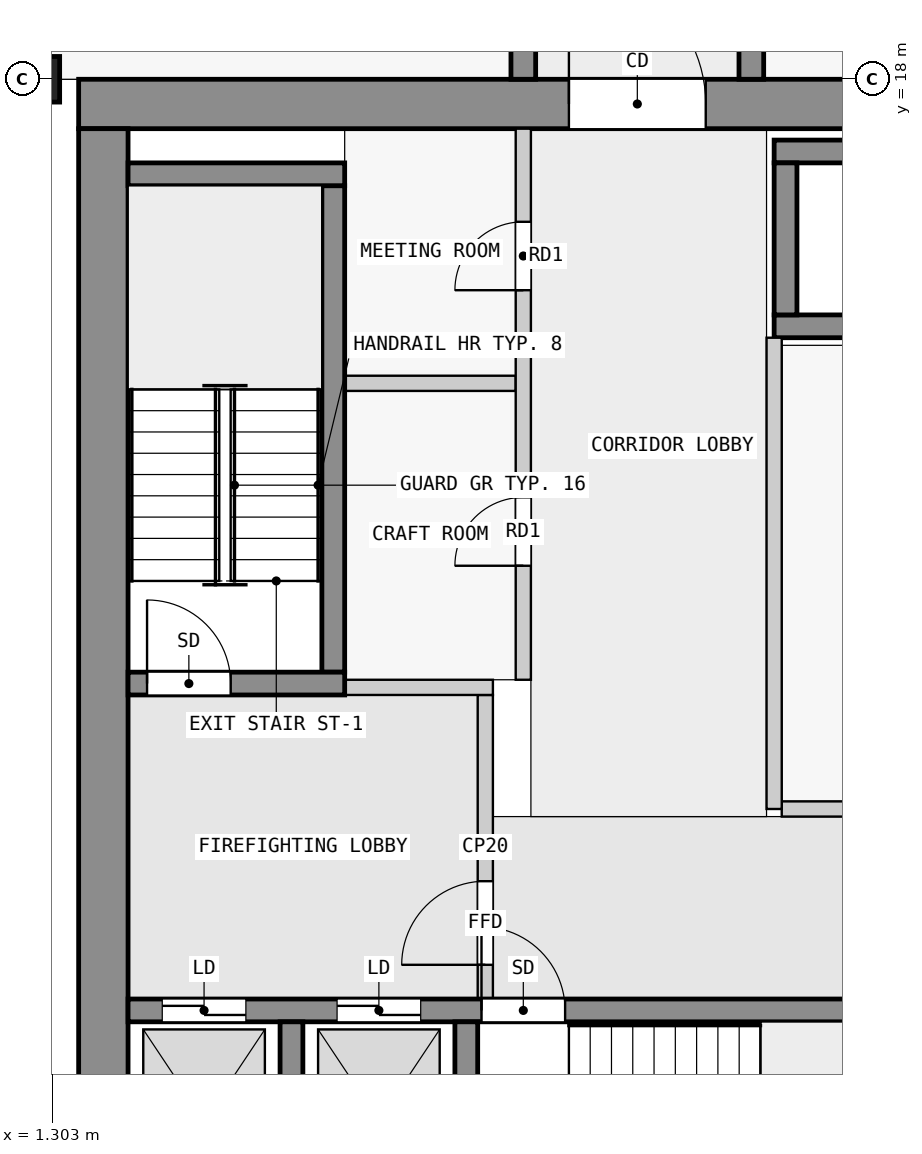
"""IFC4 building model, lengths in metres.
Left out: names, types, materials, properties, quantities, classifications, styles, units other than length and angle.
Written with IfcOpenShell. Run it as: python <this file> out.ifc"""

import sys

from ifc_helpers import new_model, si_unit, direction, frame, frame_2d, origin, origin_2d, place, context, subcontext, project, spatial, rectangle, extrude, element, fill, save


model = new_model("IFC4")
c1 = context("Model", 3, precision=1e-05, world=origin(), true_north=direction((0.0, 1.0)))
c2 = subcontext(c1, "Body", "Model", "MODEL_VIEW")
j1 = project(units=[si_unit("LENGTHUNIT", "METRE"), si_unit("PLANEANGLEUNIT", "RADIAN")], contexts=[c1])
p1 = place(None, origin())
s1 = spatial("IfcSite", under=j1, at=p1, CompositionType="ELEMENT")
p2 = place(p1, origin())
s2 = spatial("IfcBuilding", under=s1, at=p2, CompositionType="ELEMENT")
p3 = place(p2, frame((0.0, 0.0, 120.3)))
s3 = spatial("IfcBuildingStorey", under=s2, at=p3, CompositionType="ELEMENT", Elevation=120.3)
p4 = place(p3, frame((0.7, 18.0, 0.0), z_axis=(0.0, 0.0, 1.0), x_axis=(0.0, 1.0, 0.0)))
e1 = element("IfcColumn", 1, at=p4, inside=s3, PredefinedType="COLUMN", context=c2, shape_type="SweptSolid", body=[
    extrude(rectangle(XDim=0.6, YDim=1.4, at=origin_2d()), origin(), (0.0, 0.0, 1.0), 3.5),
])
p5 = place(p3, frame((1.65, 17.675, 0.0), z_axis=(0.0, 0.0, 1.0), x_axis=(1.0, 0.0, 0.0)))
e2 = element("IfcWall", 2, at=p5, inside=s3, PredefinedType="SHEAR", context=c2, shape_type="SweptSolid", body=[
    extrude(rectangle(XDim=20.85, YDim=0.65, at=frame_2d((10.425, 0.0))), origin(), (0.0, 0.0, 1.0), 3.2),
])
p6 = place(p5, frame((6.45, 0.0, 0.0)))
e3 = element("IfcOpeningElement", 3, at=p6, cuts=e2, PredefinedType="OPENING", context=c2, shape_type="SweptSolid", body=[
    extrude(rectangle(XDim=1.8, YDim=2.1, at=frame_2d((0.9, 1.05))), frame((0.0, 0.335, 0.0), z_axis=(0.0, -1.0, 0.0), x_axis=(1.0, 0.0, 0.0)), (0.0, 0.0, 1.0), 0.67),
])
p7 = place(p3, frame((1.975, 2.5, 0.0), z_axis=(0.0, 0.0, 1.0), x_axis=(0.0, 1.0, 0.0)))
e4 = element("IfcWall", 4, at=p7, inside=s3, PredefinedType="SHEAR", context=c2, shape_type="SweptSolid", body=[
    extrude(rectangle(XDim=14.85, YDim=0.65, at=frame_2d((7.425, 0.0))), origin(), (0.0, 0.0, 1.0), 3.2),
])
for number, where, z_axis, x_axis in (
    (5, (4.45, 2.8, 0.0), (0.0, 0.0, 1.0), (0.0, 1.0, 0.0)),
    (6, (6.75, 2.8, 0.0), (0.0, 0.0, 1.0), (0.0, 1.0, 0.0)),
):
    element("IfcWall", number, at=place(p3, frame(where, z_axis=z_axis, x_axis=x_axis)), inside=s3, PredefinedType="SHEAR", context=c2, shape_type="SweptSolid", body=[
        extrude(rectangle(XDim=2.8, YDim=0.3, at=frame_2d((1.4, 0.0))), origin(), (0.0, 0.0, 1.0), 3.2),
    ])
p8 = place(p3, frame((2.3, 5.75, 0.0), z_axis=(0.0, 0.0, 1.0), x_axis=(1.0, 0.0, 0.0)))
e7 = element("IfcWall", 7, at=p8, inside=s3, PredefinedType="SHEAR", context=c2, shape_type="SweptSolid", body=[
    extrude(rectangle(XDim=18.8, YDim=0.3, at=frame_2d((9.4, 0.0))), origin(), (0.0, 0.0, 1.0), 3.2),
])
p9 = place(p8, frame((4.65, 0.0, 0.0)))
e8 = element("IfcOpeningElement", 8, at=p9, cuts=e7, PredefinedType="OPENING", context=c2, shape_type="SweptSolid", body=[
    extrude(rectangle(XDim=1.1, YDim=2.1, at=frame_2d((0.55, 1.05))), frame((0.0, 0.16, 0.0), z_axis=(0.0, -1.0, 0.0), x_axis=(1.0, 0.0, 0.0)), (0.0, 0.0, 1.0), 0.32),
])
p10 = place(p8, frame((0.45, 0.0, 0.0)))
e9 = element("IfcOpeningElement", 9, at=p10, cuts=e7, PredefinedType="OPENING", context=c2, shape_type="SweptSolid", body=[
    extrude(rectangle(XDim=1.1, YDim=2.1, at=frame_2d((0.55, 1.05))), frame((0.0, 0.16, 0.0), z_axis=(0.0, -1.0, 0.0), x_axis=(1.0, 0.0, 0.0)), (0.0, 0.0, 1.0), 0.32),
])
p11 = place(p8, frame((2.75, 0.0, 0.0)))
e10 = element("IfcOpeningElement", 10, at=p11, cuts=e7, PredefinedType="OPENING", context=c2, shape_type="SweptSolid", body=[
    extrude(rectangle(XDim=1.1, YDim=2.1, at=frame_2d((0.55, 1.05))), frame((0.0, 0.16, 0.0), z_axis=(0.0, -1.0, 0.0), x_axis=(1.0, 0.0, 0.0)), (0.0, 0.0, 1.0), 0.32),
])
p12 = place(p8, frame((11.85, 0.0, 0.0)))
e11 = element("IfcOpeningElement", 11, at=p12, cuts=e7, PredefinedType="OPENING", context=c2, shape_type="SweptSolid", body=[
    extrude(rectangle(XDim=1.1, YDim=2.1, at=frame_2d((0.55, 1.05))), frame((0.0, 0.16, 0.0), z_axis=(0.0, -1.0, 0.0), x_axis=(1.0, 0.0, 0.0)), (0.0, 0.0, 1.0), 0.32),
])
p13 = place(p8, frame((14.35, 0.0, 0.0)))
e12 = element("IfcOpeningElement", 12, at=p13, cuts=e7, PredefinedType="OPENING", context=c2, shape_type="SweptSolid", body=[
    extrude(rectangle(XDim=1.1, YDim=2.1, at=frame_2d((0.55, 1.05))), frame((0.0, 0.16, 0.0), z_axis=(0.0, -1.0, 0.0), x_axis=(1.0, 0.0, 0.0)), (0.0, 0.0, 1.0), 0.32),
])
p14 = place(p8, frame((16.85, 0.0, 0.0)))
e13 = element("IfcOpeningElement", 13, at=p14, cuts=e7, PredefinedType="OPENING", context=c2, shape_type="SweptSolid", body=[
    extrude(rectangle(XDim=1.1, YDim=2.1, at=frame_2d((0.55, 1.05))), frame((0.0, 0.16, 0.0), z_axis=(0.0, -1.0, 0.0), x_axis=(1.0, 0.0, 0.0)), (0.0, 0.0, 1.0), 0.32),
])
p15 = place(p3, frame((2.3, 10.05, 0.0), z_axis=(0.0, 0.0, 1.0), x_axis=(1.0, 0.0, 0.0)))
e14 = element("IfcWall", 14, at=p15, inside=s3, PredefinedType="SHEAR", context=c2, shape_type="SweptSolid", body=[
    extrude(rectangle(XDim=2.85, YDim=0.3, at=frame_2d((1.425, 0.0))), origin(), (0.0, 0.0, 1.0), 3.2),
])
p16 = place(p15, frame((0.25, 0.0, 0.0)))
e15 = element("IfcOpeningElement", 15, at=p16, cuts=e14, PredefinedType="OPENING", context=c2, shape_type="SweptSolid", body=[
    extrude(rectangle(XDim=1.1, YDim=2.1, at=frame_2d((0.55, 1.05))), frame((0.0, 0.16, 0.0), z_axis=(0.0, -1.0, 0.0), x_axis=(1.0, 0.0, 0.0)), (0.0, 0.0, 1.0), 0.32),
])
p17 = place(p3, frame((5.0, 10.2, 0.0), z_axis=(0.0, 0.0, 1.0), x_axis=(0.0, 1.0, 0.0)))
e16 = element("IfcWall", 16, at=p17, inside=s3, PredefinedType="SHEAR", context=c2, shape_type="SweptSolid", body=[
    extrude(rectangle(XDim=6.4, YDim=0.3, at=frame_2d((3.2, 0.0))), origin(), (0.0, 0.0, 1.0), 3.2),
])
p18 = place(p3, frame((2.3, 16.75, 0.0), z_axis=(0.0, 0.0, 1.0), x_axis=(1.0, 0.0, 0.0)))
e17 = element("IfcWall", 17, at=p18, inside=s3, PredefinedType="SHEAR", context=c2, shape_type="SweptSolid", body=[
    extrude(rectangle(XDim=2.85, YDim=0.3, at=frame_2d((1.425, 0.0))), origin(), (0.0, 0.0, 1.0), 3.2),
])
for number, where, z_axis, x_axis in (
    (18, (10.8, 17.05, 0.0), (0.0, 0.0, 1.0), (1.0, 0.0, 0.0)),
    (19, (10.8, 14.75, 0.0), (0.0, 0.0, 1.0), (1.0, 0.0, 0.0)),
):
    element("IfcWall", number, at=place(p3, frame(where, z_axis=z_axis, x_axis=x_axis)), inside=s3, PredefinedType="SHEAR", context=c2, shape_type="SweptSolid", body=[
        extrude(rectangle(XDim=7.8, YDim=0.3, at=frame_2d((3.9, 0.0))), origin(), (0.0, 0.0, 1.0), 3.2),
    ])
p19 = place(p3, frame((10.95, 14.9, 0.0), z_axis=(0.0, 0.0, 1.0), x_axis=(0.0, 1.0, 0.0)))
e20 = element("IfcWall", 20, at=p19, inside=s3, PredefinedType="SHEAR", context=c2, shape_type="SweptSolid", body=[
    extrude(rectangle(XDim=2.0, YDim=0.3, at=frame_2d((1.0, 0.0))), origin(), (0.0, 0.0, 1.0), 3.2),
])
p20 = place(p3, frame((7.5, 18.0, 0.0), z_axis=(0.0, 0.0, 1.0), x_axis=(0.0, 1.0, 0.0)))
e21 = element("IfcWall", 21, at=p20, inside=s3, PredefinedType="SHEAR", context=c2, shape_type="SweptSolid", body=[
    extrude(rectangle(XDim=27.0, YDim=0.325, at=frame_2d((13.5, 0.0))), origin(), (0.0, 0.0, 1.0), 3.2),
])
p21 = place(p20, frame((1.75, 0.0, 0.0)))
e22 = element("IfcOpeningElement", 22, at=p21, cuts=e21, PredefinedType="OPENING", context=c2, shape_type="SweptSolid", body=[
    extrude(rectangle(XDim=1.0, YDim=2.1, at=frame_2d((0.5, 1.05))), frame((0.0, 0.172, 0.0), z_axis=(0.0, -1.0, 0.0), x_axis=(1.0, 0.0, 0.0)), (0.0, 0.0, 1.0), 0.345),
])
p22 = place(p20, frame((9.25, 0.0, 0.0)))
e23 = element("IfcOpeningElement", 23, at=p22, cuts=e21, PredefinedType="OPENING", context=c2, shape_type="SweptSolid", body=[
    extrude(rectangle(XDim=1.0, YDim=2.1, at=frame_2d((0.5, 1.05))), frame((0.0, 0.172, 0.0), z_axis=(0.0, -1.0, 0.0), x_axis=(1.0, 0.0, 0.0)), (0.0, 0.0, 1.0), 0.345),
])
p23 = place(p20, frame((21.35, 0.0, 0.0)))
e24 = element("IfcOpeningElement", 24, at=p23, cuts=e21, PredefinedType="OPENING", context=c2, shape_type="SweptSolid", body=[
    extrude(rectangle(XDim=1.0, YDim=2.1, at=frame_2d((0.5, 1.05))), frame((0.0, 0.172, 0.0), z_axis=(0.0, -1.0, 0.0), x_axis=(1.0, 0.0, 0.0)), (0.0, 0.0, 1.0), 0.345),
])
p24 = place(p3, frame((10.5, 18.0, 0.0), z_axis=(0.0, 0.0, 1.0), x_axis=(0.0, 1.0, 0.0)))
e25 = element("IfcWall", 25, at=p24, inside=s3, PredefinedType="SHEAR", context=c2, shape_type="SweptSolid", body=[
    extrude(rectangle(XDim=27.0, YDim=0.325, at=frame_2d((13.5, 0.0))), origin(), (0.0, 0.0, 1.0), 3.2),
])
p25 = place(p24, frame((1.75, 0.0, 0.0)))
e26 = element("IfcOpeningElement", 26, at=p25, cuts=e25, PredefinedType="OPENING", context=c2, shape_type="SweptSolid", body=[
    extrude(rectangle(XDim=1.0, YDim=2.1, at=frame_2d((0.5, 1.05))), frame((0.0, 0.172, 0.0), z_axis=(0.0, -1.0, 0.0), x_axis=(1.0, 0.0, 0.0)), (0.0, 0.0, 1.0), 0.345),
])
p26 = place(p24, frame((6.25, 0.0, 0.0)))
e27 = element("IfcOpeningElement", 27, at=p26, cuts=e25, PredefinedType="OPENING", context=c2, shape_type="SweptSolid", body=[
    extrude(rectangle(XDim=1.0, YDim=2.1, at=frame_2d((0.5, 1.05))), frame((0.0, 0.172, 0.0), z_axis=(0.0, -1.0, 0.0), x_axis=(1.0, 0.0, 0.0)), (0.0, 0.0, 1.0), 0.345),
])
p27 = place(p24, frame((13.05, 0.0, 0.0)))
e28 = element("IfcOpeningElement", 28, at=p27, cuts=e25, PredefinedType="OPENING", context=c2, shape_type="SweptSolid", body=[
    extrude(rectangle(XDim=1.0, YDim=2.1, at=frame_2d((0.5, 1.05))), frame((0.0, 0.172, 0.0), z_axis=(0.0, -1.0, 0.0), x_axis=(1.0, 0.0, 0.0)), (0.0, 0.0, 1.0), 0.345),
])
p28 = place(p24, frame((19.75, 0.0, 0.0)))
e29 = element("IfcOpeningElement", 29, at=p28, cuts=e25, PredefinedType="OPENING", context=c2, shape_type="SweptSolid", body=[
    extrude(rectangle(XDim=1.0, YDim=2.1, at=frame_2d((0.5, 1.05))), frame((0.0, 0.172, 0.0), z_axis=(0.0, -1.0, 0.0), x_axis=(1.0, 0.0, 0.0)), (0.0, 0.0, 1.0), 0.345),
])
p29 = place(p24, frame((23.25, 0.0, 0.0)))
e30 = element("IfcOpeningElement", 30, at=p29, cuts=e25, PredefinedType="OPENING", context=c2, shape_type="SweptSolid", body=[
    extrude(rectangle(XDim=0.9, YDim=2.1, at=frame_2d((0.45, 1.05))), frame((0.0, 0.172, 0.0), z_axis=(0.0, -1.0, 0.0), x_axis=(1.0, 0.0, 0.0)), (0.0, 0.0, 1.0), 0.345),
])
p30 = place(p24, frame((25.45, 0.0, 0.0)))
e31 = element("IfcOpeningElement", 31, at=p30, cuts=e25, PredefinedType="OPENING", context=c2, shape_type="SweptSolid", body=[
    extrude(rectangle(XDim=1.0, YDim=2.1, at=frame_2d((0.5, 1.05))), frame((0.0, 0.172, 0.0), z_axis=(0.0, -1.0, 0.0), x_axis=(1.0, 0.0, 0.0)), (0.0, 0.0, 1.0), 0.345),
])
p31 = place(p3, frame((7.0, 5.9, 0.0), z_axis=(0.0, 0.0, 1.0), x_axis=(0.0, 1.0, 0.0)))
e32 = element("IfcWall", 32, at=p31, inside=s3, PredefinedType="PARTITIONING", context=c2, shape_type="SweptSolid", body=[
    extrude(rectangle(XDim=4.0, YDim=0.2, at=frame_2d((2.0, 0.0))), origin(), (0.0, 0.0, 1.0), 3.2),
])
p32 = place(p31, frame((0.45, 0.0, 0.0)))
e33 = element("IfcOpeningElement", 33, at=p32, cuts=e32, PredefinedType="OPENING", context=c2, shape_type="SweptSolid", body=[
    extrude(rectangle(XDim=1.1, YDim=2.1, at=frame_2d((0.55, 1.05))), frame((0.0, 0.11, 0.0), z_axis=(0.0, -1.0, 0.0), x_axis=(1.0, 0.0, 0.0)), (0.0, 0.0, 1.0), 0.22),
])
p33 = place(p3, frame((5.15, 10.0, 0.0), z_axis=(0.0, 0.0, 1.0), x_axis=(1.0, 0.0, 0.0)))
e34 = element("IfcWall", 34, at=p33, inside=s3, PredefinedType="PARTITIONING", context=c2, shape_type="SweptSolid", body=[
    extrude(rectangle(XDim=1.95, YDim=0.2, at=frame_2d((0.975, 0.0))), origin(), (0.0, 0.0, 1.0), 3.2),
])
p34 = place(p3, frame((10.8, 8.4, 0.0), z_axis=(0.0, 0.0, 1.0), x_axis=(0.0, 1.0, 0.0)))
e35 = element("IfcWall", 35, at=p34, inside=s3, PredefinedType="PARTITIONING", context=c2, shape_type="SweptSolid", body=[
    extrude(rectangle(XDim=6.2, YDim=0.2, at=frame_2d((3.1, 0.0))), origin(), (0.0, 0.0, 1.0), 3.2),
])
p35 = place(p3, frame((10.9, 8.4, 0.0), z_axis=(0.0, 0.0, 1.0), x_axis=(1.0, 0.0, 0.0)))
e36 = element("IfcWall", 36, at=p35, inside=s3, PredefinedType="PARTITIONING", context=c2, shape_type="SweptSolid", body=[
    extrude(rectangle(XDim=5.0, YDim=0.2, at=frame_2d((2.5, 0.0))), origin(), (0.0, 0.0, 1.0), 3.2),
])
p36 = place(p3, frame((7.5, 10.1, 0.0), z_axis=(0.0, 0.0, 1.0), x_axis=(0.0, 1.0, 0.0)))
e37 = element("IfcWall", 37, at=p36, inside=s3, PredefinedType="PARTITIONING", context=c2, shape_type="SweptSolid", body=[
    extrude(rectangle(XDim=7.25, YDim=0.2, at=frame_2d((3.625, 0.0))), origin(), (0.0, 0.0, 1.0), 3.2),
])
p37 = place(p36, frame((1.5, 0.0, 0.0)))
e38 = element("IfcOpeningElement", 38, at=p37, cuts=e37, PredefinedType="OPENING", context=c2, shape_type="SweptSolid", body=[
    extrude(rectangle(XDim=0.9, YDim=2.1, at=frame_2d((0.45, 1.05))), frame((0.0, 0.11, 0.0), z_axis=(0.0, -1.0, 0.0), x_axis=(1.0, 0.0, 0.0)), (0.0, 0.0, 1.0), 0.22),
])
p38 = place(p36, frame((5.125, 0.0, 0.0)))
e39 = element("IfcOpeningElement", 39, at=p38, cuts=e37, PredefinedType="OPENING", context=c2, shape_type="SweptSolid", body=[
    extrude(rectangle(XDim=0.9, YDim=2.1, at=frame_2d((0.45, 1.05))), frame((0.0, 0.11, 0.0), z_axis=(0.0, -1.0, 0.0), x_axis=(1.0, 0.0, 0.0)), (0.0, 0.0, 1.0), 0.22),
])
p39 = place(p3, frame((5.15, 14.0, 0.0), z_axis=(0.0, 0.0, 1.0), x_axis=(1.0, 0.0, 0.0)))
e40 = element("IfcWall", 40, at=p39, inside=s3, PredefinedType="PARTITIONING", context=c2, shape_type="SweptSolid", body=[
    extrude(rectangle(XDim=2.25, YDim=0.2, at=frame_2d((1.125, 0.0))), origin(), (0.0, 0.0, 1.0), 3.2),
])
p40 = place(p32, origin())
e41 = element("IfcDoor", 41, at=p40, inside=s3, OperationType="SINGLE_SWING_LEFT", PredefinedType="DOOR", context=c2, shape_type="SweptSolid", body=[
    extrude(rectangle(XDim=1.1, YDim=2.1, at=frame_2d((0.55, 1.05))), frame((0.0, 0.025, 0.0), z_axis=(0.0, -1.0, 0.0), x_axis=(1.0, 0.0, 0.0)), (0.0, 0.0, 1.0), 0.05),
])
fill(e33, e41)
p41 = place(p16, origin())
e42 = element("IfcDoor", 42, at=p41, inside=s3, OperationType="SINGLE_SWING_RIGHT", PredefinedType="DOOR", context=c2, shape_type="SweptSolid", body=[
    extrude(rectangle(XDim=1.1, YDim=2.1, at=frame_2d((0.55, 1.05))), frame((0.0, 0.025, 0.0), z_axis=(0.0, -1.0, 0.0), x_axis=(1.0, 0.0, 0.0)), (0.0, 0.0, 1.0), 0.05),
])
fill(e15, e42)
p42 = place(p9, origin())
e43 = element("IfcDoor", 43, at=p42, inside=s3, OperationType="SINGLE_SWING_LEFT", PredefinedType="DOOR", context=c2, shape_type="SweptSolid", body=[
    extrude(rectangle(XDim=1.1, YDim=2.1, at=frame_2d((0.55, 1.05))), frame((0.0, 0.025, 0.0), z_axis=(0.0, -1.0, 0.0), x_axis=(1.0, 0.0, 0.0)), (0.0, 0.0, 1.0), 0.05),
])
fill(e8, e43)
p43 = place(p10, origin())
e44 = element("IfcDoor", 44, at=p43, inside=s3, OperationType="DOUBLE_DOOR_SLIDING", PredefinedType="DOOR", context=c2, shape_type="SweptSolid", body=[
    extrude(rectangle(XDim=1.1, YDim=2.1, at=frame_2d((0.55, 1.05))), frame((0.0, 0.025, 0.0), z_axis=(0.0, -1.0, 0.0), x_axis=(1.0, 0.0, 0.0)), (0.0, 0.0, 1.0), 0.05),
])
fill(e9, e44)
p44 = place(p11, origin())
e45 = element("IfcDoor", 45, at=p44, inside=s3, OperationType="DOUBLE_DOOR_SLIDING", PredefinedType="DOOR", context=c2, shape_type="SweptSolid", body=[
    extrude(rectangle(XDim=1.1, YDim=2.1, at=frame_2d((0.55, 1.05))), frame((0.0, 0.025, 0.0), z_axis=(0.0, -1.0, 0.0), x_axis=(1.0, 0.0, 0.0)), (0.0, 0.0, 1.0), 0.05),
])
fill(e10, e45)
p45 = place(p6, origin())
e46 = element("IfcDoor", 46, at=p45, inside=s3, OperationType="DOUBLE_DOOR_SINGLE_SWING", PredefinedType="DOOR", context=c2, shape_type="SweptSolid", body=[
    extrude(rectangle(XDim=1.8, YDim=2.1, at=frame_2d((0.9, 1.05))), frame((0.0, 0.025, 0.0), z_axis=(0.0, -1.0, 0.0), x_axis=(1.0, 0.0, 0.0)), (0.0, 0.0, 1.0), 0.05),
])
fill(e3, e46)
p46 = place(p37, origin())
e47 = element("IfcDoor", 47, at=p46, inside=s3, OperationType="SINGLE_SWING_RIGHT", PredefinedType="DOOR", context=c2, shape_type="SweptSolid", body=[
    extrude(rectangle(XDim=0.9, YDim=2.1, at=frame_2d((0.45, 1.05))), frame((0.0, 0.025, 0.0), z_axis=(0.0, -1.0, 0.0), x_axis=(1.0, 0.0, 0.0)), (0.0, 0.0, 1.0), 0.05),
])
fill(e38, e47)
p47 = place(p38, origin())
e48 = element("IfcDoor", 48, at=p47, inside=s3, OperationType="SINGLE_SWING_RIGHT", PredefinedType="DOOR", context=c2, shape_type="SweptSolid", body=[
    extrude(rectangle(XDim=0.9, YDim=2.1, at=frame_2d((0.45, 1.05))), frame((0.0, 0.025, 0.0), z_axis=(0.0, -1.0, 0.0), x_axis=(1.0, 0.0, 0.0)), (0.0, 0.0, 1.0), 0.05),
])
fill(e39, e48)
save(model, sys.argv[1])
